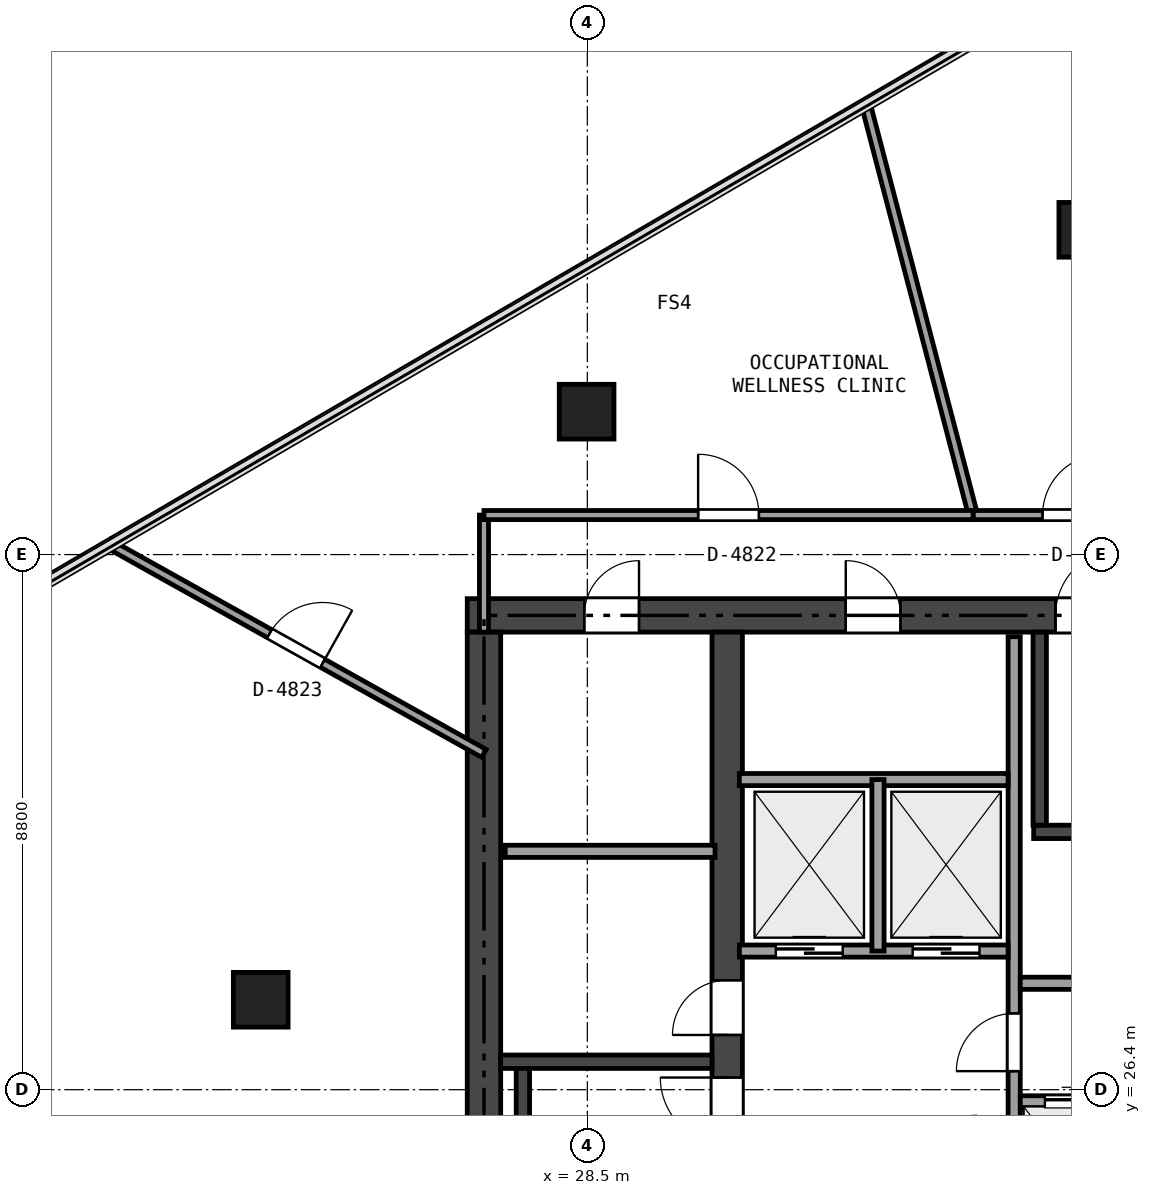
"""IFC4 building model, lengths in metres.
Left out: names, types, materials, properties, quantities, classifications, styles, units other than length and angle.
Written with IfcOpenShell. Run it as: python <this file> out.ifc"""

import sys

from ifc_helpers import new_model, si_unit, direction, frame, frame_2d, origin, origin_2d, place, context, subcontext, project, spatial, rectangle, extrude, element, fill, save


model = new_model("IFC4")
c1 = context("Model", 3, precision=1e-05, world=origin(), true_north=direction((0.0, 1.0)))
c2 = subcontext(c1, "Body", "Model", "MODEL_VIEW")
j1 = project(units=[si_unit("LENGTHUNIT", "METRE"), si_unit("PLANEANGLEUNIT", "RADIAN")], contexts=[c1])
p1 = place(None, origin())
s1 = spatial("IfcSite", under=j1, at=p1, CompositionType="ELEMENT")
p2 = place(p1, origin())
s2 = spatial("IfcBuilding", under=s1, at=p2, CompositionType="ELEMENT")
p3 = place(p2, frame((0.0, 0.0, 180.6)))
s3 = spatial("IfcBuildingStorey", under=s2, at=p3, CompositionType="ELEMENT", Elevation=180.6)
p4 = place(p3, frame((26.525, 34.2, 0.0), z_axis=(0.0, 0.0, 1.0), x_axis=(1.0, 0.0, 0.0)))
e1 = element("IfcWall", 1, at=p4, inside=s3, PredefinedType="SHEAR", context=c2, shape_type="SweptSolid", body=[
    extrude(rectangle(XDim=21.35, YDim=0.55, at=frame_2d((10.675, 0.0))), origin(), (0.0, 0.0, 1.0), 3.32),
])
p5 = place(p4, frame((9.675, 0.0, 0.0)))
e2 = element("IfcOpeningElement", 2, at=p5, cuts=e1, PredefinedType="OPENING", context=c2, shape_type="SweptSolid", body=[
    extrude(rectangle(XDim=1.1, YDim=2.15, at=frame_2d((0.55, 1.075))), frame((0.0, 0.285, 0.0), z_axis=(0.0, -1.0, 0.0), x_axis=(1.0, 0.0, 0.0)), (0.0, 0.0, 1.0), 0.57),
])
p6 = place(p4, frame((1.925, 0.0, 0.0)))
e3 = element("IfcOpeningElement", 3, at=p6, cuts=e1, PredefinedType="OPENING", context=c2, shape_type="SweptSolid", body=[
    extrude(rectangle(XDim=0.9, YDim=2.1, at=frame_2d((0.45, 1.05))), frame((0.0, 0.285, 0.0), z_axis=(0.0, -1.0, 0.0), x_axis=(1.0, 0.0, 0.0)), (0.0, 0.0, 1.0), 0.57),
])
p7 = place(p4, frame((6.225, 0.0, 0.0)))
e4 = element("IfcOpeningElement", 4, at=p7, cuts=e1, PredefinedType="OPENING", context=c2, shape_type="SweptSolid", body=[
    extrude(rectangle(XDim=0.9, YDim=2.1, at=frame_2d((0.45, 1.05))), frame((0.0, 0.285, 0.0), z_axis=(0.0, -1.0, 0.0), x_axis=(1.0, 0.0, 0.0)), (0.0, 0.0, 1.0), 0.57),
])
p8 = place(p3, frame((26.8, 18.875, 0.0), z_axis=(0.0, 0.0, 1.0), x_axis=(0.0, 1.0, 0.0)))
e5 = element("IfcWall", 5, at=p8, inside=s3, PredefinedType="SHEAR", context=c2, shape_type="SweptSolid", body=[
    extrude(rectangle(XDim=15.05, YDim=0.55, at=frame_2d((7.525, 0.0))), origin(), (0.0, 0.0, 1.0), 3.32),
])
p9 = place(p3, frame((30.8, 18.875, 0.0), z_axis=(0.0, 0.0, 1.0), x_axis=(0.0, 1.0, 0.0)))
e6 = element("IfcWall", 6, at=p9, inside=s3, PredefinedType="SHEAR", context=c2, shape_type="SweptSolid", body=[
    extrude(rectangle(XDim=15.05, YDim=0.5, at=frame_2d((7.525, 0.0))), origin(), (0.0, 0.0, 1.0), 3.32),
])
p10 = place(p9, frame((6.625, 0.0, 0.0)))
e7 = element("IfcOpeningElement", 7, at=p10, cuts=e6, PredefinedType="OPENING", context=c2, shape_type="SweptSolid", body=[
    extrude(rectangle(XDim=1.1, YDim=2.15, at=frame_2d((0.55, 1.075))), frame((0.0, 0.26, 0.0), z_axis=(0.0, -1.0, 0.0), x_axis=(1.0, 0.0, 0.0)), (0.0, 0.0, 1.0), 0.52),
])
p11 = place(p9, frame((8.425, 0.0, 0.0)))
e8 = element("IfcOpeningElement", 8, at=p11, cuts=e6, PredefinedType="OPENING", context=c2, shape_type="SweptSolid", body=[
    extrude(rectangle(XDim=0.9, YDim=2.1, at=frame_2d((0.45, 1.05))), frame((0.0, 0.26, 0.0), z_axis=(0.0, -1.0, 0.0), x_axis=(1.0, 0.0, 0.0)), (0.0, 0.0, 1.0), 0.52),
])
p12 = place(p3, frame((27.075, 26.86, 0.0), z_axis=(0.0, 0.0, 1.0), x_axis=(1.0, 0.0, 0.0)))
e9 = element("IfcWall", 9, at=p12, inside=s3, PredefinedType="SHEAR", context=c2, shape_type="SweptSolid", body=[
    extrude(rectangle(XDim=3.475, YDim=0.22, at=frame_2d((1.738, 0.0))), origin(), (0.0, 0.0, 1.0), 3.32),
])
p13 = place(p3, frame((27.44, 19.35, 0.0), z_axis=(0.0, 0.0, 1.0), x_axis=(0.0, 1.0, 0.0)))
e10 = element("IfcWall", 10, at=p13, inside=s3, PredefinedType="SHEAR", context=c2, shape_type="SweptSolid", body=[
    extrude(rectangle(XDim=7.4, YDim=0.22, at=frame_2d((3.7, 0.0))), origin(), (0.0, 0.0, 1.0), 3.32),
])
p14 = place(p3, frame((35.84, 30.64, 0.0), z_axis=(0.0, 0.0, 1.0), x_axis=(1.0, 0.0, 0.0)))
e11 = element("IfcWall", 11, at=p14, inside=s3, PredefinedType="SHEAR", context=c2, shape_type="SweptSolid", body=[
    extrude(rectangle(XDim=7.61, YDim=0.22, at=frame_2d((3.805, 0.0))), origin(), (0.0, 0.0, 1.0), 3.32),
])
p15 = place(p3, frame((35.94, 30.75, 0.0), z_axis=(0.0, 0.0, 1.0), x_axis=(0.0, 1.0, 0.0)))
e12 = element("IfcWall", 12, at=p15, inside=s3, PredefinedType="SHEAR", context=c2, shape_type="SweptSolid", body=[
    extrude(rectangle(XDim=3.175, YDim=0.22, at=frame_2d((1.587, 0.0))), origin(), (0.0, 0.0, 1.0), 3.32),
])
for number, where, z_axis, x_axis in (
    (13, (36.706, 40.541, 0.0), (0.0, 0.0, 1.0), (1.0, 0.0, 0.0)),
    (14, (28.488, 37.55, 0.0), (0.0, 0.0, 1.0), (1.0, 0.0, 0.0)),
    (15, (23.128, 27.879, 0.0), (0.0, 0.0, 1.0), (1.0, 0.0, 0.0)),
):
    element("IfcColumn", number, at=place(p3, frame(where, z_axis=z_axis, x_axis=x_axis)), inside=s3, PredefinedType="COLUMN", context=c2, shape_type="SweptSolid", body=[
        extrude(rectangle(XDim=0.9, YDim=0.9, at=origin_2d()), origin(), (0.0, 0.0, 1.0), 3.32),
    ])
p16 = place(p3, frame((27.15, 30.32, 0.0), z_axis=(0.0, 0.0, 1.0), x_axis=(1.0, 0.0, 0.0)))
e16 = element("IfcWall", 16, at=p16, inside=s3, PredefinedType="SOLIDWALL", context=c2, shape_type="SweptSolid", body=[
    extrude(rectangle(XDim=3.45, YDim=0.2, at=frame_2d((1.725, 0.0))), origin(), (0.0, 0.0, 1.0), 3.32),
])
p17 = place(p3, frame((35.52, 18.95, 0.0), z_axis=(0.0, 0.0, 1.0), x_axis=(0.0, 1.0, 0.0)))
e17 = element("IfcWall", 17, at=p17, inside=s3, PredefinedType="SOLIDWALL", context=c2, shape_type="SweptSolid", body=[
    extrude(rectangle(XDim=14.9, YDim=0.2, at=frame_2d((7.45, 0.0))), origin(), (0.0, 0.0, 1.0), 2.841),
])
p18 = place(p17, frame((7.755, 0.0, 0.0)))
e18 = element("IfcOpeningElement", 18, at=p18, cuts=e17, PredefinedType="OPENING", context=c2, shape_type="SweptSolid", body=[
    extrude(rectangle(XDim=0.95, YDim=2.15, at=frame_2d((0.475, 1.075))), frame((0.0, 0.11, 0.0), z_axis=(0.0, -1.0, 0.0), x_axis=(1.0, 0.0, 0.0)), (0.0, 0.0, 1.0), 0.22),
])
p19 = place(p17, frame((0.6, 0.0, 0.0)))
e19 = element("IfcOpeningElement", 19, at=p19, cuts=e17, PredefinedType="OPENING", context=c2, shape_type="SweptSolid", body=[
    extrude(rectangle(XDim=0.9, YDim=2.1, at=frame_2d((0.45, 1.05))), frame((0.0, 0.11, 0.0), z_axis=(0.0, -1.0, 0.0), x_axis=(1.0, 0.0, 0.0)), (0.0, 0.0, 1.0), 0.22),
])
p20 = place(p3, frame((31.0, 28.68, 0.0), z_axis=(0.0, 0.0, 1.0), x_axis=(1.0, 0.0, 0.0)))
e20 = element("IfcWall", 20, at=p20, inside=s3, PredefinedType="SOLIDWALL", context=c2, shape_type="SweptSolid", body=[
    extrude(rectangle(XDim=4.42, YDim=0.2, at=frame_2d((2.21, 0.0))), origin(), (0.0, 0.0, 1.0), 3.32),
])
p21 = place(p20, frame((0.6, 0.0, 0.0)))
e21 = element("IfcOpeningElement", 21, at=p21, cuts=e20, PredefinedType="OPENING", context=c2, shape_type="SweptSolid", body=[
    extrude(rectangle(XDim=1.1, YDim=2.15, at=frame_2d((0.55, 1.075))), frame((0.0, 0.11, 0.0), z_axis=(0.0, -1.0, 0.0), x_axis=(1.0, 0.0, 0.0)), (0.0, 0.0, 1.0), 0.22),
])
p22 = place(p20, frame((2.85, 0.0, 0.0)))
e22 = element("IfcOpeningElement", 22, at=p22, cuts=e20, PredefinedType="OPENING", context=c2, shape_type="SweptSolid", body=[
    extrude(rectangle(XDim=1.1, YDim=2.15, at=frame_2d((0.55, 1.075))), frame((0.0, 0.11, 0.0), z_axis=(0.0, -1.0, 0.0), x_axis=(1.0, 0.0, 0.0)), (0.0, 0.0, 1.0), 0.22),
])
p23 = place(p3, frame((31.0, 31.5, 0.0), z_axis=(0.0, 0.0, 1.0), x_axis=(1.0, 0.0, 0.0)))
e23 = element("IfcWall", 23, at=p23, inside=s3, PredefinedType="SOLIDWALL", context=c2, shape_type="SweptSolid", body=[
    extrude(rectangle(XDim=4.42, YDim=0.2, at=frame_2d((2.21, 0.0))), origin(), (0.0, 0.0, 1.0), 3.32),
])
p24 = place(p3, frame((33.28, 28.68, 0.0), z_axis=(0.0, 0.0, 1.0), x_axis=(0.0, 1.0, 0.0)))
e24 = element("IfcWall", 24, at=p24, inside=s3, PredefinedType="SOLIDWALL", context=c2, shape_type="SweptSolid", body=[
    extrude(rectangle(XDim=2.82, YDim=0.2, at=frame_2d((1.41, 0.0))), origin(), (0.0, 0.0, 1.0), 3.32),
])
p25 = place(p3, frame((35.62, 28.15, 0.0), z_axis=(0.0, 0.0, 1.0), x_axis=(1.0, 0.0, 0.0)))
e25 = element("IfcWall", 25, at=p25, inside=s3, PredefinedType="SOLIDWALL", context=c2, shape_type="SweptSolid", body=[
    extrude(rectangle(XDim=7.88, YDim=0.2, at=frame_2d((3.94, 0.0))), origin(), (0.0, 0.0, 1.0), 3.32),
])
p26 = place(p3, frame((35.62, 26.2, 0.0), z_axis=(0.0, 0.0, 1.0), x_axis=(1.0, 0.0, 0.0)))
e26 = element("IfcWall", 26, at=p26, inside=s3, PredefinedType="SOLIDWALL", context=c2, shape_type="SweptSolid", body=[
    extrude(rectangle(XDim=7.88, YDim=0.2, at=frame_2d((3.94, 0.0))), origin(), (0.0, 0.0, 1.0), 3.32),
])
p27 = place(p26, frame((0.405, 0.0, 0.0)))
e27 = element("IfcOpeningElement", 27, at=p27, cuts=e26, PredefinedType="OPENING", context=c2, shape_type="SweptSolid", body=[
    extrude(rectangle(XDim=1.1, YDim=2.15, at=frame_2d((0.55, 1.075))), frame((0.0, 0.11, 0.0), z_axis=(0.0, -1.0, 0.0), x_axis=(1.0, 0.0, 0.0)), (0.0, 0.0, 1.0), 0.22),
])
p28 = place(p26, frame((2.355, 0.0, 0.0)))
e28 = element("IfcOpeningElement", 28, at=p28, cuts=e26, PredefinedType="OPENING", context=c2, shape_type="SweptSolid", body=[
    extrude(rectangle(XDim=1.1, YDim=2.15, at=frame_2d((0.55, 1.075))), frame((0.0, 0.11, 0.0), z_axis=(0.0, -1.0, 0.0), x_axis=(1.0, 0.0, 0.0)), (0.0, 0.0, 1.0), 0.22),
])
p29 = place(p26, frame((4.305, 0.0, 0.0)))
e29 = element("IfcOpeningElement", 29, at=p29, cuts=e26, PredefinedType="OPENING", context=c2, shape_type="SweptSolid", body=[
    extrude(rectangle(XDim=1.1, YDim=2.15, at=frame_2d((0.55, 1.075))), frame((0.0, 0.11, 0.0), z_axis=(0.0, -1.0, 0.0), x_axis=(1.0, 0.0, 0.0)), (0.0, 0.0, 1.0), 0.22),
])
p30 = place(p26, frame((6.255, 0.0, 0.0)))
e30 = element("IfcOpeningElement", 30, at=p30, cuts=e26, PredefinedType="OPENING", context=c2, shape_type="SweptSolid", body=[
    extrude(rectangle(XDim=1.1, YDim=2.15, at=frame_2d((0.55, 1.075))), frame((0.0, 0.11, 0.0), z_axis=(0.0, -1.0, 0.0), x_axis=(1.0, 0.0, 0.0)), (0.0, 0.0, 1.0), 0.22),
])
p31 = place(p3, frame((33.073, 42.631, 0.0), z_axis=(0.0, 0.0, 1.0), x_axis=(0.252694156197, -0.967546207384, 0.0)))
e31 = element("IfcWall", 31, at=p31, inside=s3, PredefinedType="PARTITIONING", context=c2, shape_type="SweptSolid", body=[
    extrude(rectangle(XDim=7.009, YDim=0.15, at=frame_2d((3.504, 0.0))), origin(), (0.0, 0.0, 1.0), 2.905),
])
p32 = place(p3, frame((34.844, 35.85, 0.0), z_axis=(0.0, 0.0, 1.0), x_axis=(1.0, 0.0, 0.0)))
e32 = element("IfcWall", 32, at=p32, inside=s3, PredefinedType="PARTITIONING", context=c2, shape_type="SweptSolid", body=[
    extrude(rectangle(XDim=3.286, YDim=0.15, at=frame_2d((1.643, 0.0))), origin(), (0.0, 0.0, 1.0), 2.697),
])
p33 = place(p32, frame((1.143, 0.0, 0.0)))
e33 = element("IfcOpeningElement", 33, at=p33, cuts=e32, PredefinedType="OPENING", context=c2, shape_type="SweptSolid", body=[
    extrude(rectangle(XDim=1.0, YDim=2.15, at=frame_2d((0.5, 1.075))), frame((0.0, 0.085, 0.0), z_axis=(0.0, -1.0, 0.0), x_axis=(1.0, 0.0, 0.0)), (0.0, 0.0, 1.0), 0.17),
])
p34 = place(p3, frame((20.62, 35.382, 0.0), z_axis=(0.0, 0.0, 1.0), x_axis=(0.873024248024, -0.487676801132, 0.0)))
e34 = element("IfcWall", 34, at=p34, inside=s3, PredefinedType="PARTITIONING", context=c2, shape_type="SweptSolid", body=[
    extrude(rectangle(XDim=7.079, YDim=0.15, at=frame_2d((3.54, 0.0))), origin(), (0.0, 0.0, 1.0), 2.905),
])
p35 = place(p34, frame((3.039, 0.0, 0.0)))
e35 = element("IfcOpeningElement", 35, at=p35, cuts=e34, PredefinedType="OPENING", context=c2, shape_type="SweptSolid", body=[
    extrude(rectangle(XDim=1.0, YDim=2.15, at=frame_2d((0.5, 1.075))), frame((0.0, 0.085, 0.0), z_axis=(0.0, -1.0, 0.0), x_axis=(1.0, 0.0, 0.0)), (0.0, 0.0, 1.0), 0.17),
])
p36 = place(p3, frame((26.8, 33.925, 0.0), z_axis=(0.0, 0.0, 1.0), x_axis=(0.0, 1.0, 0.0)))
e36 = element("IfcWall", 36, at=p36, inside=s3, PredefinedType="PARTITIONING", context=c2, shape_type="SweptSolid", body=[
    extrude(rectangle(XDim=1.925, YDim=0.15, at=frame_2d((0.962, 0.0))), origin(), (0.0, 0.0, 1.0), 2.905),
])
p37 = place(p3, frame((26.8, 35.85, 0.0), z_axis=(0.0, 0.0, 1.0), x_axis=(1.0, 0.0, 0.0)))
e37 = element("IfcWall", 37, at=p37, inside=s3, PredefinedType="PARTITIONING", context=c2, shape_type="SweptSolid", body=[
    extrude(rectangle(XDim=8.044, YDim=0.15, at=frame_2d((4.022, 0.0))), origin(), (0.0, 0.0, 1.0), 2.697),
])
p38 = place(p37, frame((3.522, 0.0, 0.0)))
e38 = element("IfcOpeningElement", 38, at=p38, cuts=e37, PredefinedType="OPENING", context=c2, shape_type="SweptSolid", body=[
    extrude(rectangle(XDim=1.0, YDim=2.15, at=frame_2d((0.5, 1.075))), frame((0.0, 0.085, 0.0), z_axis=(0.0, -1.0, 0.0), x_axis=(1.0, 0.0, 0.0)), (0.0, 0.0, 1.0), 0.17),
])
p39 = place(p10, origin())
e39 = element("IfcDoor", 39, at=p39, inside=s3, OperationType="SINGLE_SWING_RIGHT", PredefinedType="DOOR", context=c2, shape_type="SweptSolid", body=[
    extrude(rectangle(XDim=1.1, YDim=2.15, at=frame_2d((0.55, 1.075))), frame((0.0, 0.025, 0.0), z_axis=(0.0, -1.0, 0.0), x_axis=(1.0, 0.0, 0.0)), (0.0, 0.0, 1.0), 0.05),
])
fill(e7, e39)
p40 = place(p5, origin())
e40 = element("IfcDoor", 40, at=p40, inside=s3, OperationType="SINGLE_SWING_RIGHT", PredefinedType="DOOR", context=c2, shape_type="SweptSolid", body=[
    extrude(rectangle(XDim=1.1, YDim=2.15, at=frame_2d((0.55, 1.075))), frame((0.0, 0.025, 0.0), z_axis=(0.0, -1.0, 0.0), x_axis=(1.0, 0.0, 0.0)), (0.0, 0.0, 1.0), 0.05),
])
fill(e2, e40)
p41 = place(p18, origin())
e41 = element("IfcDoor", 41, at=p41, inside=s3, OperationType="SINGLE_SWING_LEFT", PredefinedType="DOOR", context=c2, shape_type="SweptSolid", body=[
    extrude(rectangle(XDim=0.95, YDim=2.15, at=frame_2d((0.475, 1.075))), frame((0.0, 0.025, 0.0), z_axis=(0.0, -1.0, 0.0), x_axis=(1.0, 0.0, 0.0)), (0.0, 0.0, 1.0), 0.05),
])
fill(e18, e41)
p42 = place(p11, origin())
e42 = element("IfcDoor", 42, at=p42, inside=s3, OperationType="SINGLE_SWING_LEFT", PredefinedType="DOOR", context=c2, shape_type="SweptSolid", body=[
    extrude(rectangle(XDim=0.9, YDim=2.1, at=frame_2d((0.45, 1.05))), frame((0.0, 0.025, 0.0), z_axis=(0.0, -1.0, 0.0), x_axis=(1.0, 0.0, 0.0)), (0.0, 0.0, 1.0), 0.05),
])
fill(e8, e42)
p43 = place(p6, origin())
e43 = element("IfcDoor", 43, at=p43, inside=s3, OperationType="SINGLE_SWING_RIGHT", PredefinedType="DOOR", context=c2, shape_type="SweptSolid", body=[
    extrude(rectangle(XDim=0.9, YDim=2.1, at=frame_2d((0.45, 1.05))), frame((0.0, 0.025, 0.0), z_axis=(0.0, -1.0, 0.0), x_axis=(1.0, 0.0, 0.0)), (0.0, 0.0, 1.0), 0.05),
])
fill(e3, e43)
p44 = place(p7, origin())
e44 = element("IfcDoor", 44, at=p44, inside=s3, OperationType="SINGLE_SWING_LEFT", PredefinedType="DOOR", context=c2, shape_type="SweptSolid", body=[
    extrude(rectangle(XDim=0.9, YDim=2.1, at=frame_2d((0.45, 1.05))), frame((0.0, 0.025, 0.0), z_axis=(0.0, -1.0, 0.0), x_axis=(1.0, 0.0, 0.0)), (0.0, 0.0, 1.0), 0.05),
])
fill(e4, e44)
p45 = place(p21, origin())
e45 = element("IfcDoor", 45, at=p45, inside=s3, OperationType="SLIDING_TO_LEFT", PredefinedType="DOOR", context=c2, shape_type="SweptSolid", body=[
    extrude(rectangle(XDim=1.1, YDim=2.15, at=frame_2d((0.55, 1.075))), frame((0.0, 0.025, 0.0), z_axis=(0.0, -1.0, 0.0), x_axis=(1.0, 0.0, 0.0)), (0.0, 0.0, 1.0), 0.05),
])
fill(e21, e45)
p46 = place(p22, origin())
e46 = element("IfcDoor", 46, at=p46, inside=s3, OperationType="SLIDING_TO_LEFT", PredefinedType="DOOR", context=c2, shape_type="SweptSolid", body=[
    extrude(rectangle(XDim=1.1, YDim=2.15, at=frame_2d((0.55, 1.075))), frame((0.0, 0.025, 0.0), z_axis=(0.0, -1.0, 0.0), x_axis=(1.0, 0.0, 0.0)), (0.0, 0.0, 1.0), 0.05),
])
fill(e22, e46)
p47 = place(p27, origin())
e47 = element("IfcDoor", 47, at=p47, inside=s3, OperationType="SLIDING_TO_LEFT", PredefinedType="DOOR", context=c2, shape_type="SweptSolid", body=[
    extrude(rectangle(XDim=1.1, YDim=2.15, at=frame_2d((0.55, 1.075))), frame((0.0, 0.025, 0.0), z_axis=(0.0, -1.0, 0.0), x_axis=(1.0, 0.0, 0.0)), (0.0, 0.0, 1.0), 0.05),
])
fill(e27, e47)
p48 = place(p33, origin())
e48 = element("IfcDoor", 48, at=p48, inside=s3, OperationType="SINGLE_SWING_RIGHT", PredefinedType="DOOR", context=c2, shape_type="SweptSolid", body=[
    extrude(rectangle(XDim=1.0, YDim=2.15, at=frame_2d((0.5, 1.075))), frame((0.0, 0.025, 0.0), z_axis=(0.0, -1.0, 0.0), x_axis=(1.0, 0.0, 0.0)), (0.0, 0.0, 1.0), 0.05),
])
fill(e33, e48)
p49 = place(p38, origin())
e49 = element("IfcDoor", 49, at=p49, inside=s3, OperationType="SINGLE_SWING_LEFT", PredefinedType="DOOR", context=c2, shape_type="SweptSolid", body=[
    extrude(rectangle(XDim=1.0, YDim=2.15, at=frame_2d((0.5, 1.075))), frame((0.0, 0.025, 0.0), z_axis=(0.0, -1.0, 0.0), x_axis=(1.0, 0.0, 0.0)), (0.0, 0.0, 1.0), 0.05),
])
fill(e38, e49)
p50 = place(p35, origin())
e50 = element("IfcDoor", 50, at=p50, inside=s3, OperationType="SINGLE_SWING_RIGHT", PredefinedType="DOOR", context=c2, shape_type="SweptSolid", body=[
    extrude(rectangle(XDim=1.0, YDim=2.15, at=frame_2d((0.5, 1.075))), frame((0.0, 0.025, 0.0), z_axis=(0.0, -1.0, 0.0), x_axis=(1.0, 0.0, 0.0)), (0.0, 0.0, 1.0), 0.05),
])
fill(e35, e50)
save(model, sys.argv[1])
